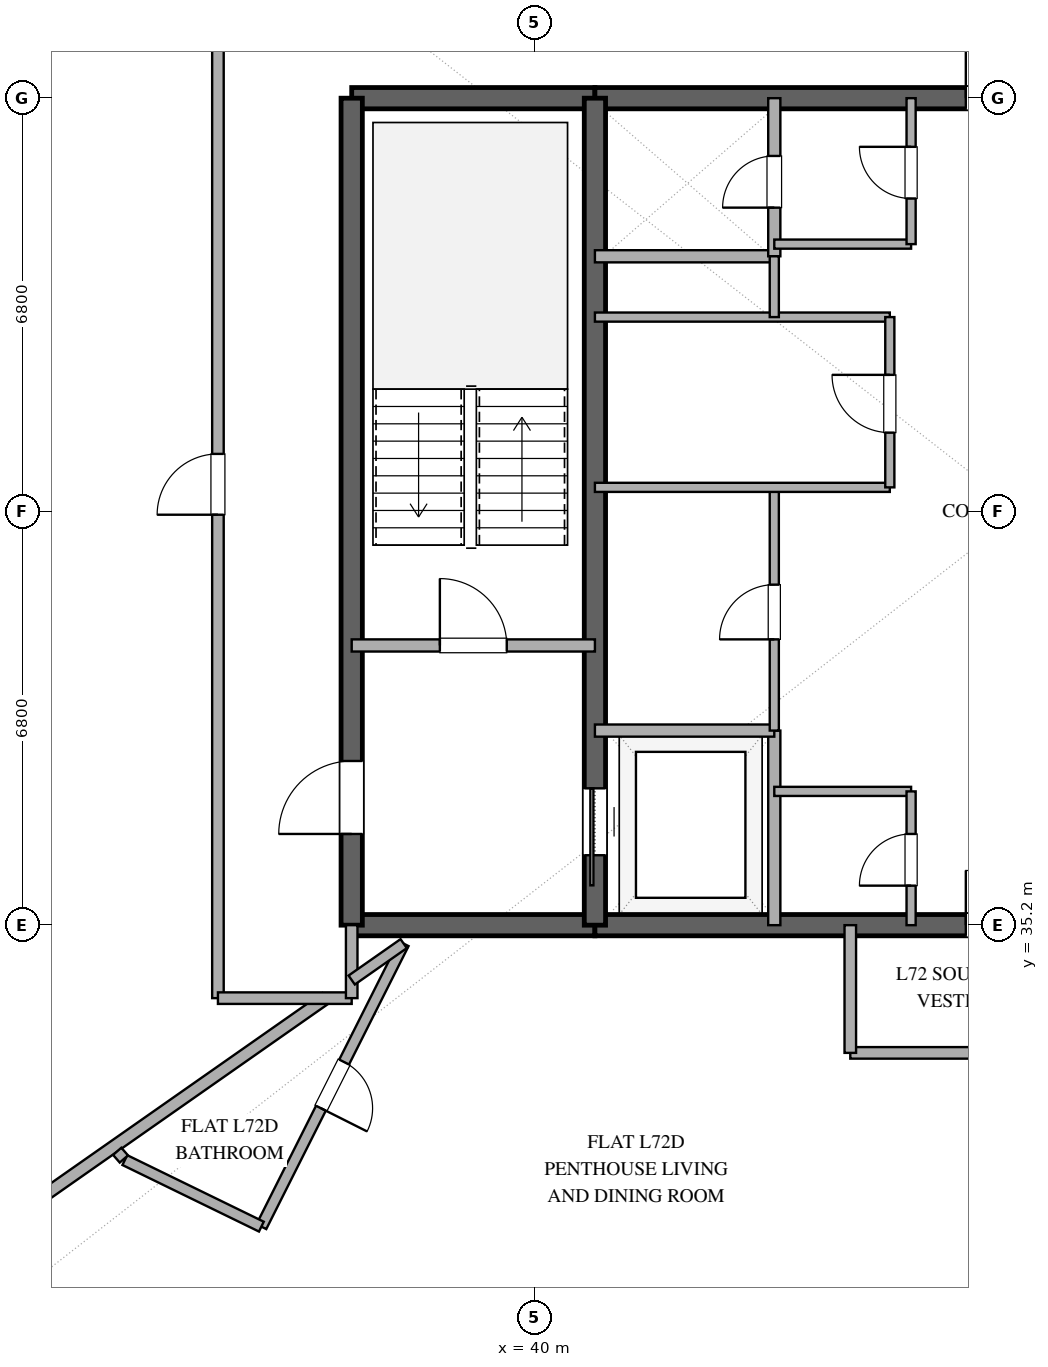
"""IFC4 building model, lengths in metres.
Left out: names, types, materials, properties, quantities, classifications, styles, units other than length and angle.
Written with IfcOpenShell. Run it as: python <this file> out.ifc"""

import sys

from ifc_helpers import new_model, si_unit, direction, frame, frame_2d, origin, place, context, subcontext, project, spatial, rectangle, extrude, element, fill, save


model = new_model("IFC4")
c1 = context("Model", 3, precision=1e-05, world=origin(), true_north=direction((0.0, 1.0)))
c2 = subcontext(c1, "Body", "Model", "MODEL_VIEW")
j1 = project(units=[si_unit("LENGTHUNIT", "METRE"), si_unit("PLANEANGLEUNIT", "RADIAN")], contexts=[c1])
p1 = place(None, origin())
s1 = spatial("IfcSite", under=j1, at=p1, CompositionType="ELEMENT")
p2 = place(p1, origin())
s2 = spatial("IfcBuilding", under=s1, at=p2, CompositionType="ELEMENT")
p3 = place(p2, frame((0.0, 0.0, 280.2)))
s3 = spatial("IfcBuildingStorey", under=s2, at=p3, CompositionType="ELEMENT", Elevation=280.2)
p4 = place(p3, frame((37.0, 35.2, 0.0), z_axis=(0.0, 0.0, 1.0), x_axis=(1.0, 0.0, 0.0)))
e1 = element("IfcWall", 1, at=p4, inside=s3, PredefinedType="SHEAR", context=c2, shape_type="SweptSolid", body=[
    extrude(rectangle(XDim=4.0, YDim=0.35, at=frame_2d((2.0, 0.0))), origin(), (0.0, 0.0, 1.0), 3.37),
])
p5 = place(p3, frame((41.0, 35.2, 0.0), z_axis=(0.0, 0.0, 1.0), x_axis=(1.0, 0.0, 0.0)))
e2 = element("IfcWall", 2, at=p5, inside=s3, PredefinedType="SHEAR", context=c2, shape_type="SweptSolid", body=[
    extrude(rectangle(XDim=14.0, YDim=0.35, at=frame_2d((7.0, 0.0))), origin(), (0.0, 0.0, 1.0), 3.37),
])
p6 = place(p5, frame((6.1, 0.0, 0.0)))
e3 = element("IfcOpeningElement", 3, at=p6, cuts=e2, PredefinedType="OPENING", context=c2, shape_type="SweptSolid", body=[
    extrude(rectangle(XDim=1.8, YDim=2.25, at=frame_2d((0.9, 1.125))), frame((0.0, 0.185, 0.0), z_axis=(0.0, -1.0, 0.0), x_axis=(1.0, 0.0, 0.0)), (0.0, 0.0, 1.0), 0.37),
])
p7 = place(p3, frame((37.0, 48.8, 0.0), z_axis=(0.0, 0.0, 1.0), x_axis=(1.0, 0.0, 0.0)))
e4 = element("IfcWall", 4, at=p7, inside=s3, PredefinedType="SHEAR", context=c2, shape_type="SweptSolid", body=[
    extrude(rectangle(XDim=4.0, YDim=0.35, at=frame_2d((2.0, 0.0))), origin(), (0.0, 0.0, 1.0), 3.37),
])
p8 = place(p3, frame((41.0, 48.8, 0.0), z_axis=(0.0, 0.0, 1.0), x_axis=(1.0, 0.0, 0.0)))
e5 = element("IfcWall", 5, at=p8, inside=s3, PredefinedType="SHEAR", context=c2, shape_type="SweptSolid", body=[
    extrude(rectangle(XDim=14.0, YDim=0.35, at=frame_2d((7.0, 0.0))), origin(), (0.0, 0.0, 1.0), 3.37),
])
p9 = place(p8, frame((6.1, 0.0, 0.0)))
e6 = element("IfcOpeningElement", 6, at=p9, cuts=e5, PredefinedType="OPENING", context=c2, shape_type="SweptSolid", body=[
    extrude(rectangle(XDim=1.8, YDim=2.25, at=frame_2d((0.9, 1.125))), frame((0.0, 0.185, 0.0), z_axis=(0.0, -1.0, 0.0), x_axis=(1.0, 0.0, 0.0)), (0.0, 0.0, 1.0), 0.37),
])
p10 = place(p3, frame((37.0, 35.2, 0.0), z_axis=(0.0, 0.0, 1.0), x_axis=(0.0, 1.0, 0.0)))
e7 = element("IfcWall", 7, at=p10, inside=s3, PredefinedType="SHEAR", context=c2, shape_type="SweptSolid", body=[
    extrude(rectangle(XDim=13.6, YDim=0.35, at=frame_2d((6.8, 0.0))), origin(), (0.0, 0.0, 1.0), 3.37),
])
p11 = place(p10, frame((1.5, 0.0, 0.0)))
e8 = element("IfcOpeningElement", 8, at=p11, cuts=e7, PredefinedType="OPENING", context=c2, shape_type="SweptSolid", body=[
    extrude(rectangle(XDim=1.2, YDim=2.15, at=frame_2d((0.6, 1.075))), frame((0.0, 0.185, 0.0), z_axis=(0.0, -1.0, 0.0), x_axis=(1.0, 0.0, 0.0)), (0.0, 0.0, 1.0), 0.37),
])
p12 = place(p3, frame((41.0, 35.2, 0.0), z_axis=(0.0, 0.0, 1.0), x_axis=(0.0, 1.0, 0.0)))
e9 = element("IfcWall", 9, at=p12, inside=s3, PredefinedType="SHEAR", context=c2, shape_type="SweptSolid", body=[
    extrude(rectangle(XDim=13.6, YDim=0.35, at=frame_2d((6.8, 0.0))), origin(), (0.0, 0.0, 1.0), 3.37),
])
p13 = place(p12, frame((1.15, 0.0, 0.0)))
e10 = element("IfcOpeningElement", 10, at=p13, cuts=e9, PredefinedType="OPENING", context=c2, shape_type="SweptSolid", body=[
    extrude(rectangle(XDim=1.1, YDim=2.2, at=frame_2d((0.55, 1.1))), frame((0.0, 0.185, 0.0), z_axis=(0.0, -1.0, 0.0), x_axis=(1.0, 0.0, 0.0)), (0.0, 0.0, 1.0), 0.37),
])
p14 = place(p3, frame((37.0, 39.8, 0.0), z_axis=(0.0, 0.0, 1.0), x_axis=(1.0, 0.0, 0.0)))
e11 = element("IfcWall", 11, at=p14, inside=s3, PredefinedType="SOLIDWALL", context=c2, shape_type="SweptSolid", body=[
    extrude(rectangle(XDim=4.0, YDim=0.2, at=frame_2d((2.0, 0.0))), origin(), (0.0, 0.0, 1.0), 2.73),
])
p15 = place(p14, frame((1.45, 0.0, 0.0)))
e12 = element("IfcOpeningElement", 12, at=p15, cuts=e11, PredefinedType="OPENING", context=c2, shape_type="SweptSolid", body=[
    extrude(rectangle(XDim=1.1, YDim=2.15, at=frame_2d((0.55, 1.075))), frame((0.0, 0.11, 0.0), z_axis=(0.0, -1.0, 0.0), x_axis=(1.0, 0.0, 0.0)), (0.0, 0.0, 1.0), 0.22),
])
p16 = place(p3, frame((43.95, 35.2, 0.0), z_axis=(0.0, 0.0, 1.0), x_axis=(0.0, 1.0, 0.0)))
e13 = element("IfcWall", 13, at=p16, inside=s3, PredefinedType="SOLIDWALL", context=c2, shape_type="SweptSolid", body=[
    extrude(rectangle(XDim=3.2, YDim=0.2, at=frame_2d((1.6, 0.0))), origin(), (0.0, 0.0, 1.0), 2.73),
])
for number, where, z_axis, x_axis in (
    (14, (41.0, 38.4, 0.0), (0.0, 0.0, 1.0), (1.0, 0.0, 0.0)),
    (15, (41.0, 46.2, 0.0), (0.0, 0.0, 1.0), (1.0, 0.0, 0.0)),
):
    element("IfcWall", number, at=place(p3, frame(where, z_axis=z_axis, x_axis=x_axis)), inside=s3, PredefinedType="SOLIDWALL", context=c2, shape_type="SweptSolid", body=[
        extrude(rectangle(XDim=2.95, YDim=0.2, at=frame_2d((1.475, 0.0))), origin(), (0.0, 0.0, 1.0), 2.73),
    ])
p17 = place(p3, frame((43.95, 46.2, 0.0), z_axis=(0.0, 0.0, 1.0), x_axis=(0.0, 1.0, 0.0)))
e16 = element("IfcWall", 16, at=p17, inside=s3, PredefinedType="SOLIDWALL", context=c2, shape_type="SweptSolid", body=[
    extrude(rectangle(XDim=2.6, YDim=0.2, at=frame_2d((1.3, 0.0))), origin(), (0.0, 0.0, 1.0), 2.73),
])
p18 = place(p17, frame((0.8, 0.0, 0.0)))
e17 = element("IfcOpeningElement", 17, at=p18, cuts=e16, PredefinedType="OPENING", context=c2, shape_type="SweptSolid", body=[
    extrude(rectangle(XDim=0.85, YDim=2.15, at=frame_2d((0.425, 1.075))), frame((0.0, 0.11, 0.0), z_axis=(0.0, -1.0, 0.0), x_axis=(1.0, 0.0, 0.0)), (0.0, 0.0, 1.0), 0.22),
])
p19 = place(p3, frame((43.95, 38.4, 0.0), z_axis=(0.0, 0.0, 1.0), x_axis=(0.0, 1.0, 0.0)))
e18 = element("IfcWall", 18, at=p19, inside=s3, PredefinedType="PARTITIONING", context=c2, shape_type="SweptSolid", body=[
    extrude(rectangle(XDim=4.0, YDim=0.15, at=frame_2d((2.0, 0.0))), origin(), (0.0, 0.0, 1.0), 2.73),
])
p20 = place(p19, frame((1.5, 0.0, 0.0)))
e19 = element("IfcOpeningElement", 19, at=p20, cuts=e18, PredefinedType="OPENING", context=c2, shape_type="SweptSolid", body=[
    extrude(rectangle(XDim=0.9, YDim=2.15, at=frame_2d((0.45, 1.075))), frame((0.0, 0.085, 0.0), z_axis=(0.0, -1.0, 0.0), x_axis=(1.0, 0.0, 0.0)), (0.0, 0.0, 1.0), 0.17),
])
for number, where, z_axis, x_axis in (
    (20, (41.0, 42.4, 0.0), (0.0, 0.0, 1.0), (1.0, 0.0, 0.0)),
    (21, (41.0, 45.2, 0.0), (0.0, 0.0, 1.0), (1.0, 0.0, 0.0)),
):
    element("IfcWall", number, at=place(p3, frame(where, z_axis=z_axis, x_axis=x_axis)), inside=s3, PredefinedType="PARTITIONING", context=c2, shape_type="SweptSolid", body=[
        extrude(rectangle(XDim=4.85, YDim=0.15, at=frame_2d((2.425, 0.0))), origin(), (0.0, 0.0, 1.0), 2.73),
    ])
p21 = place(p3, frame((43.95, 45.2, 0.0), z_axis=(0.0, 0.0, 1.0), x_axis=(0.0, 1.0, 0.0)))
e22 = element("IfcWall", 22, at=p21, inside=s3, PredefinedType="PARTITIONING", context=c2, shape_type="SweptSolid", body=[
    extrude(rectangle(XDim=1.0, YDim=0.15, at=frame_2d((0.5, 0.0))), origin(), (0.0, 0.0, 1.0), 2.73),
])
p22 = place(p3, frame((45.85, 42.4, 0.0), z_axis=(0.0, 0.0, 1.0), x_axis=(0.0, 1.0, 0.0)))
e23 = element("IfcWall", 23, at=p22, inside=s3, PredefinedType="PARTITIONING", context=c2, shape_type="SweptSolid", body=[
    extrude(rectangle(XDim=2.8, YDim=0.15, at=frame_2d((1.4, 0.0))), origin(), (0.0, 0.0, 1.0), 2.73),
])
p23 = place(p22, frame((0.9, 0.0, 0.0)))
e24 = element("IfcOpeningElement", 24, at=p23, cuts=e23, PredefinedType="OPENING", context=c2, shape_type="SweptSolid", body=[
    extrude(rectangle(XDim=0.95, YDim=2.15, at=frame_2d((0.475, 1.075))), frame((0.0, 0.085, 0.0), z_axis=(0.0, -1.0, 0.0), x_axis=(1.0, 0.0, 0.0)), (0.0, 0.0, 1.0), 0.17),
])
p24 = place(p3, frame((43.95, 37.4, 0.0), z_axis=(0.0, 0.0, 1.0), x_axis=(1.0, 0.0, 0.0)))
e25 = element("IfcWall", 25, at=p24, inside=s3, PredefinedType="PARTITIONING", context=c2, shape_type="SweptSolid", body=[
    extrude(rectangle(XDim=2.25, YDim=0.15, at=frame_2d((1.125, 0.0))), origin(), (0.0, 0.0, 1.0), 2.73),
])
p25 = place(p3, frame((46.2, 35.2, 0.0), z_axis=(0.0, 0.0, 1.0), x_axis=(0.0, 1.0, 0.0)))
e26 = element("IfcWall", 26, at=p25, inside=s3, PredefinedType="PARTITIONING", context=c2, shape_type="SweptSolid", body=[
    extrude(rectangle(XDim=2.2, YDim=0.15, at=frame_2d((1.1, 0.0))), origin(), (0.0, 0.0, 1.0), 2.73),
])
p26 = place(p25, frame((0.65, 0.0, 0.0)))
e27 = element("IfcOpeningElement", 27, at=p26, cuts=e26, PredefinedType="OPENING", context=c2, shape_type="SweptSolid", body=[
    extrude(rectangle(XDim=0.85, YDim=2.15, at=frame_2d((0.425, 1.075))), frame((0.0, 0.085, 0.0), z_axis=(0.0, -1.0, 0.0), x_axis=(1.0, 0.0, 0.0)), (0.0, 0.0, 1.0), 0.17),
])
p27 = place(p3, frame((43.95, 46.4, 0.0), z_axis=(0.0, 0.0, 1.0), x_axis=(1.0, 0.0, 0.0)))
e28 = element("IfcWall", 28, at=p27, inside=s3, PredefinedType="PARTITIONING", context=c2, shape_type="SweptSolid", body=[
    extrude(rectangle(XDim=2.25, YDim=0.15, at=frame_2d((1.125, 0.0))), origin(), (0.0, 0.0, 1.0), 2.73),
])
p28 = place(p3, frame((46.2, 46.4, 0.0), z_axis=(0.0, 0.0, 1.0), x_axis=(0.0, 1.0, 0.0)))
e29 = element("IfcWall", 29, at=p28, inside=s3, PredefinedType="PARTITIONING", context=c2, shape_type="SweptSolid", body=[
    extrude(rectangle(XDim=2.4, YDim=0.15, at=frame_2d((1.2, 0.0))), origin(), (0.0, 0.0, 1.0), 2.73),
])
p29 = place(p28, frame((0.75, 0.0, 0.0)))
e30 = element("IfcOpeningElement", 30, at=p29, cuts=e29, PredefinedType="OPENING", context=c2, shape_type="SweptSolid", body=[
    extrude(rectangle(XDim=0.85, YDim=2.15, at=frame_2d((0.425, 1.075))), frame((0.0, 0.085, 0.0), z_axis=(0.0, -1.0, 0.0), x_axis=(1.0, 0.0, 0.0)), (0.0, 0.0, 1.0), 0.17),
])
p30 = place(p3, frame((34.8, 34.0, 0.0), z_axis=(0.0, 0.0, 1.0), x_axis=(0.0, 1.0, 0.0)))
e31 = element("IfcWall", 31, at=p30, inside=s3, PredefinedType="PARTITIONING", context=c2, shape_type="SweptSolid", body=[
    extrude(rectangle(XDim=16.9, YDim=0.19, at=frame_2d((8.45, 0.0))), origin(), (0.0, 0.0, 1.0), 2.73),
])
p31 = place(p30, frame((7.95, 0.0, 0.0)))
e32 = element("IfcOpeningElement", 32, at=p31, cuts=e31, PredefinedType="OPENING", context=c2, shape_type="SweptSolid", body=[
    extrude(rectangle(XDim=1.0, YDim=2.2, at=frame_2d((0.5, 1.1))), frame((0.0, 0.105, 0.0), z_axis=(0.0, -1.0, 0.0), x_axis=(1.0, 0.0, 0.0)), (0.0, 0.0, 1.0), 0.21),
])
p32 = place(p3, frame((50.8, 33.1, 0.0), z_axis=(0.0, 0.0, 1.0), x_axis=(-1.0, 0.0, 0.0)))
e33 = element("IfcWall", 33, at=p32, inside=s3, PredefinedType="PARTITIONING", context=c2, shape_type="SweptSolid", body=[
    extrude(rectangle(XDim=5.6, YDim=0.19, at=frame_2d((2.8, 0.0))), origin(), (0.0, 0.0, 1.0), 2.73),
])
p33 = place(p32, frame((2.3, 0.0, 0.0)))
e34 = element("IfcOpeningElement", 34, at=p33, cuts=e33, PredefinedType="OPENING", context=c2, shape_type="SweptSolid", body=[
    extrude(rectangle(XDim=1.0, YDim=2.2, at=frame_2d((0.5, 1.1))), frame((0.0, 0.105, 0.0), z_axis=(0.0, -1.0, 0.0), x_axis=(1.0, 0.0, 0.0)), (0.0, 0.0, 1.0), 0.21),
])
p34 = place(p3, frame((37.855, 34.896, 0.0), z_axis=(0.0, 0.0, 1.0), x_axis=(-0.449274589412, -0.893393722447, 0.0)))
e35 = element("IfcWall", 35, at=p34, inside=s3, PredefinedType="PLUMBINGWALL", context=c2, shape_type="SweptSolid", body=[
    extrude(rectangle(XDim=5.209, YDim=0.18, at=frame_2d((2.604, 0.0))), origin(), (0.0, 0.0, 1.0), 2.73),
])
p35 = place(p34, frame((2.18, 0.0, 0.0)))
e36 = element("IfcOpeningElement", 36, at=p35, cuts=e35, PredefinedType="OPENING", context=c2, shape_type="SweptSolid", body=[
    extrude(rectangle(XDim=0.85, YDim=2.1, at=frame_2d((0.425, 1.05))), frame((0.0, 0.1, 0.0), z_axis=(0.0, -1.0, 0.0), x_axis=(1.0, 0.0, 0.0)), (0.0, 0.0, 1.0), 0.2),
])
p36 = place(p3, frame((36.575, 34.0, 0.0), z_axis=(0.0, 0.0, 1.0), x_axis=(-0.819138444565, -0.57359585828, 0.0)))
e37 = element("IfcWall", 37, at=p36, inside=s3, PredefinedType="PARTITIONING", context=c2, shape_type="SweptSolid", body=[
    extrude(rectangle(XDim=9.326, YDim=0.2, at=frame_2d((4.663, 0.0))), origin(), (0.0, 0.0, 1.0), 2.73),
])
p37 = place(p3, frame((35.514, 30.242, 0.0), z_axis=(0.0, 0.0, 1.0), x_axis=(-0.898915857852, 0.438121307975, 0.0)))
e38 = element("IfcWall", 38, at=p37, inside=s3, PredefinedType="PLUMBINGWALL", context=c2, shape_type="SweptSolid", body=[
    extrude(rectangle(XDim=2.498, YDim=0.18, at=frame_2d((1.249, 0.0))), origin(), (0.0, 0.0, 1.0), 2.73),
])
p38 = place(p3, frame((45.2, 33.1, 0.0), z_axis=(0.0, 0.0, 1.0), x_axis=(0.0, 1.0, 0.0)))
e39 = element("IfcWall", 39, at=p38, inside=s3, PredefinedType="PARTITIONING", context=c2, shape_type="SweptSolid", body=[
    extrude(rectangle(XDim=2.1, YDim=0.19, at=frame_2d((1.05, 0.0))), origin(), (0.0, 0.0, 1.0), 2.73),
])
p39 = place(p3, frame((37.0, 34.0, 0.0), z_axis=(0.0, 0.0, 1.0), x_axis=(-1.0, 0.0, 0.0)))
e40 = element("IfcWall", 40, at=p39, inside=s3, PredefinedType="PARTITIONING", context=c2, shape_type="SweptSolid", body=[
    extrude(rectangle(XDim=2.2, YDim=0.19, at=frame_2d((1.1, 0.0))), origin(), (0.0, 0.0, 1.0), 2.73),
])
p40 = place(p3, frame((37.0, 35.2, 0.0), z_axis=(0.0, 0.0, 1.0), x_axis=(0.0, -1.0, 0.0)))
e41 = element("IfcWall", 41, at=p40, inside=s3, PredefinedType="PARTITIONING", context=c2, shape_type="SweptSolid", body=[
    extrude(rectangle(XDim=1.2, YDim=0.19, at=frame_2d((0.6, 0.0))), origin(), (0.0, 0.0, 1.0), 2.73),
])
p41 = place(p3, frame((37.0, 34.298, 0.0), z_axis=(0.0, 0.0, 1.0), x_axis=(0.81908900763, 0.573666451502, 0.0)))
e42 = element("IfcWall", 42, at=p41, inside=s3, PredefinedType="PLUMBINGWALL", context=c2, shape_type="SweptSolid", body=[
    extrude(rectangle(XDim=1.043, YDim=0.18, at=frame_2d((0.522, 0.0))), origin(), (0.0, 0.0, 1.0), 2.73),
])
p42 = place(p3, frame((33.253, 31.355, 0.0), z_axis=(0.0, 0.0, 1.0), x_axis=(-0.656323784366, 0.754479350331, 0.0)))
e43 = element("IfcWall", 43, at=p42, inside=s3, PredefinedType="PLUMBINGWALL", context=c2, shape_type="SweptSolid", body=[
    extrude(rectangle(XDim=0.167, YDim=0.18, at=frame_2d((0.083, 0.0))), origin(), (0.0, 0.0, 1.0), 2.73),
])
p43 = place(p13, origin())
e44 = element("IfcDoor", 44, at=p43, inside=s3, OperationType="SLIDING_TO_LEFT", PredefinedType="DOOR", context=c2, shape_type="SweptSolid", body=[
    extrude(rectangle(XDim=1.1, YDim=2.2, at=frame_2d((0.55, 1.1))), frame((0.0, 0.025, 0.0), z_axis=(0.0, -1.0, 0.0), x_axis=(1.0, 0.0, 0.0)), (0.0, 0.0, 1.0), 0.05),
])
fill(e10, e44)
p44 = place(p11, origin())
e45 = element("IfcDoor", 45, at=p44, inside=s3, OperationType="SINGLE_SWING_LEFT", PredefinedType="DOOR", context=c2, shape_type="SweptSolid", body=[
    extrude(rectangle(XDim=1.2, YDim=2.15, at=frame_2d((0.6, 1.075))), frame((0.0, 0.025, 0.0), z_axis=(0.0, -1.0, 0.0), x_axis=(1.0, 0.0, 0.0)), (0.0, 0.0, 1.0), 0.05),
])
fill(e8, e45)
p45 = place(p6, origin())
e46 = element("IfcDoor", 46, at=p45, inside=s3, OperationType="DOUBLE_DOOR_SINGLE_SWING", PredefinedType="DOOR", context=c2, shape_type="SweptSolid", body=[
    extrude(rectangle(XDim=1.8, YDim=2.25, at=frame_2d((0.9, 1.125))), frame((0.0, 0.025, 0.0), z_axis=(0.0, -1.0, 0.0), x_axis=(1.0, 0.0, 0.0)), (0.0, 0.0, 1.0), 0.05),
])
fill(e3, e46)
p46 = place(p9, origin())
e47 = element("IfcDoor", 47, at=p46, inside=s3, OperationType="DOUBLE_DOOR_SINGLE_SWING", PredefinedType="DOOR", context=c2, shape_type="SweptSolid", body=[
    extrude(rectangle(XDim=1.8, YDim=2.25, at=frame_2d((0.9, 1.125))), frame((0.0, 0.025, 0.0), z_axis=(0.0, -1.0, 0.0), x_axis=(1.0, 0.0, 0.0)), (0.0, 0.0, 1.0), 0.05),
])
fill(e6, e47)
p47 = place(p15, origin())
e48 = element("IfcDoor", 48, at=p47, inside=s3, OperationType="SINGLE_SWING_LEFT", PredefinedType="DOOR", context=c2, shape_type="SweptSolid", body=[
    extrude(rectangle(XDim=1.1, YDim=2.15, at=frame_2d((0.55, 1.075))), frame((0.0, 0.025, 0.0), z_axis=(0.0, -1.0, 0.0), x_axis=(1.0, 0.0, 0.0)), (0.0, 0.0, 1.0), 0.05),
])
fill(e12, e48)
p48 = place(p18, origin())
e49 = element("IfcDoor", 49, at=p48, inside=s3, OperationType="SINGLE_SWING_LEFT", PredefinedType="DOOR", context=c2, shape_type="SweptSolid", body=[
    extrude(rectangle(XDim=0.85, YDim=2.15, at=frame_2d((0.425, 1.075))), frame((0.0, 0.025, 0.0), z_axis=(0.0, -1.0, 0.0), x_axis=(1.0, 0.0, 0.0)), (0.0, 0.0, 1.0), 0.05),
])
fill(e17, e49)
p49 = place(p20, origin())
e50 = element("IfcDoor", 50, at=p49, inside=s3, OperationType="SINGLE_SWING_LEFT", PredefinedType="DOOR", context=c2, shape_type="SweptSolid", body=[
    extrude(rectangle(XDim=0.9, YDim=2.15, at=frame_2d((0.45, 1.075))), frame((0.0, 0.025, 0.0), z_axis=(0.0, -1.0, 0.0), x_axis=(1.0, 0.0, 0.0)), (0.0, 0.0, 1.0), 0.05),
])
fill(e19, e50)
p50 = place(p23, origin())
e51 = element("IfcDoor", 51, at=p50, inside=s3, OperationType="SINGLE_SWING_RIGHT", PredefinedType="DOOR", context=c2, shape_type="SweptSolid", body=[
    extrude(rectangle(XDim=0.95, YDim=2.15, at=frame_2d((0.475, 1.075))), frame((0.0, 0.025, 0.0), z_axis=(0.0, -1.0, 0.0), x_axis=(1.0, 0.0, 0.0)), (0.0, 0.0, 1.0), 0.05),
])
fill(e24, e51)
p51 = place(p26, origin())
e52 = element("IfcDoor", 52, at=p51, inside=s3, OperationType="SINGLE_SWING_LEFT", PredefinedType="DOOR", context=c2, shape_type="SweptSolid", body=[
    extrude(rectangle(XDim=0.85, YDim=2.15, at=frame_2d((0.425, 1.075))), frame((0.0, 0.025, 0.0), z_axis=(0.0, -1.0, 0.0), x_axis=(1.0, 0.0, 0.0)), (0.0, 0.0, 1.0), 0.05),
])
fill(e27, e52)
p52 = place(p29, origin())
e53 = element("IfcDoor", 53, at=p52, inside=s3, OperationType="SINGLE_SWING_RIGHT", PredefinedType="DOOR", context=c2, shape_type="SweptSolid", body=[
    extrude(rectangle(XDim=0.85, YDim=2.15, at=frame_2d((0.425, 1.075))), frame((0.0, 0.025, 0.0), z_axis=(0.0, -1.0, 0.0), x_axis=(1.0, 0.0, 0.0)), (0.0, 0.0, 1.0), 0.05),
])
fill(e30, e53)
p53 = place(p31, origin())
e54 = element("IfcDoor", 54, at=p53, inside=s3, OperationType="SINGLE_SWING_LEFT", PredefinedType="DOOR", context=c2, shape_type="SweptSolid", body=[
    extrude(rectangle(XDim=1.0, YDim=2.2, at=frame_2d((0.5, 1.1))), frame((0.0, 0.025, 0.0), z_axis=(0.0, -1.0, 0.0), x_axis=(1.0, 0.0, 0.0)), (0.0, 0.0, 1.0), 0.05),
])
fill(e32, e54)
p54 = place(p35, origin())
e55 = element("IfcDoor", 55, at=p54, inside=s3, OperationType="SINGLE_SWING_RIGHT", PredefinedType="DOOR", context=c2, shape_type="SweptSolid", body=[
    extrude(rectangle(XDim=0.85, YDim=2.1, at=frame_2d((0.425, 1.05))), frame((0.0, 0.025, 0.0), z_axis=(0.0, -1.0, 0.0), x_axis=(1.0, 0.0, 0.0)), (0.0, 0.0, 1.0), 0.05),
])
fill(e36, e55)
save(model, sys.argv[1])
